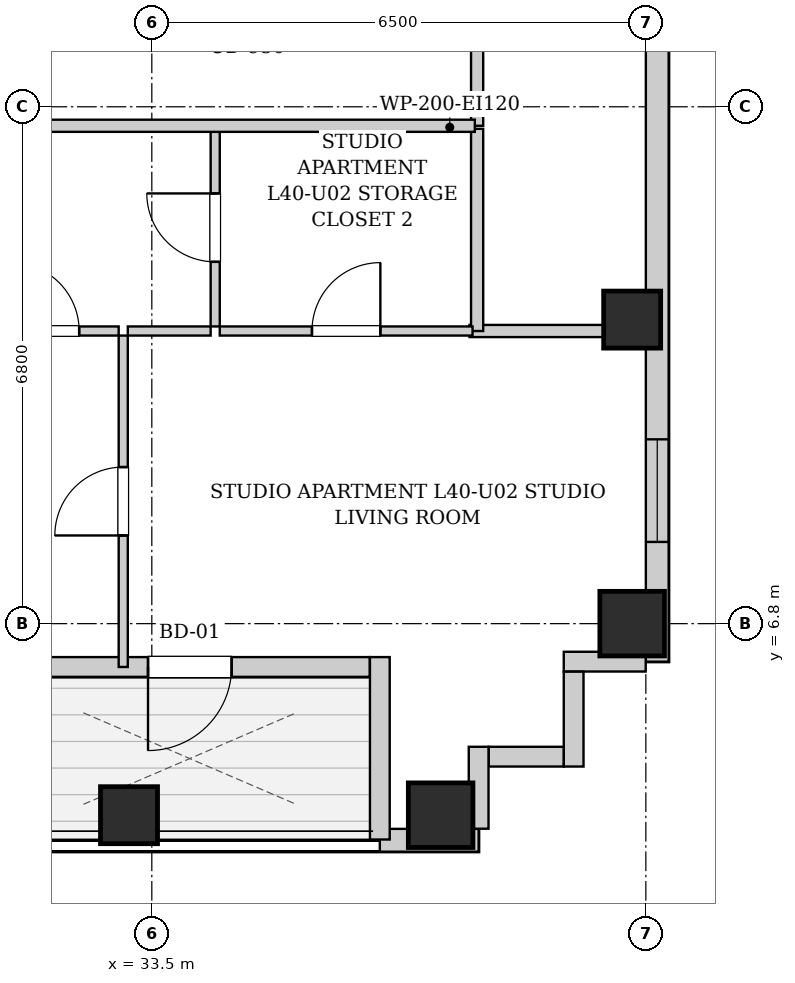
"""IFC4 building model, lengths in metres.
Left out: names, types, materials, properties, quantities, classifications, styles, units other than length and angle.
Written with IfcOpenShell. Run it as: python <this file> out.ifc"""

import sys

from ifc_helpers import new_model, si_unit, direction, frame, frame_2d, origin, origin_2d, place, context, subcontext, project, spatial, rectangle, extrude, element, fill, save


model = new_model("IFC4")
c1 = context("Model", 3, precision=1e-05, world=origin(), true_north=direction((0.0, 1.0)))
c2 = subcontext(c1, "Body", "Model", "MODEL_VIEW")
j1 = project(units=[si_unit("LENGTHUNIT", "METRE"), si_unit("PLANEANGLEUNIT", "RADIAN")], contexts=[c1])
p1 = place(None, origin())
s1 = spatial("IfcSite", under=j1, at=p1, CompositionType="ELEMENT")
p2 = place(p1, origin())
s2 = spatial("IfcBuilding", under=s1, at=p2, CompositionType="ELEMENT")
p3 = place(p2, frame((0.0, 0.0, 140.65)))
s3 = spatial("IfcBuildingStorey", under=s2, at=p3, CompositionType="ELEMENT", Elevation=140.65)
p4 = place(p3, frame((33.2, 4.28, 0.0), z_axis=(0.0, 0.0, 1.0), x_axis=(1.0, 0.0, 0.0)))
e1 = element("IfcColumn", 1, at=p4, inside=s3, PredefinedType="COLUMN", context=c2, shape_type="SweptSolid", body=[
    extrude(rectangle(XDim=0.75, YDim=0.75, at=origin_2d()), origin(), (0.0, 0.0, 1.0), 3.25),
])
for number, where, z_axis, x_axis in (
    (2, (37.3, 4.28, 0.0), (0.0, 0.0, 1.0), (1.0, 0.0, 0.0)),
    (3, (39.82, 6.8, 0.0), (0.0, 0.0, 1.0), (1.0, 0.0, 0.0)),
):
    element("IfcColumn", number, at=place(p3, frame(where, z_axis=z_axis, x_axis=x_axis)), inside=s3, PredefinedType="COLUMN", context=c2, shape_type="SweptSolid", body=[
        extrude(rectangle(XDim=0.85, YDim=0.85, at=origin_2d()), origin(), (0.0, 0.0, 1.0), 3.25),
    ])
p5 = place(p3, frame((39.82, 10.8, 0.0), z_axis=(0.0, 0.0, 1.0), x_axis=(1.0, 0.0, 0.0)))
e4 = element("IfcColumn", 4, at=p5, inside=s3, PredefinedType="COLUMN", context=c2, shape_type="SweptSolid", body=[
    extrude(rectangle(XDim=0.75, YDim=0.75, at=origin_2d()), origin(), (0.0, 0.0, 1.0), 3.25),
])
p6 = place(p3, frame((40.15, 40.8, 0.0), z_axis=(0.0, 0.0, 1.0), x_axis=(0.0, -1.0, 0.0)))
e5 = element("IfcWall", 5, at=p6, inside=s3, PredefinedType="SOLIDWALL", context=c2, shape_type="SweptSolid", body=[
    extrude(rectangle(XDim=34.5, YDim=0.3, at=frame_2d((17.25, 0.0))), origin(), (0.0, 0.0, 1.0), 2.99),
])
p7 = place(p6, frame((31.575, 0.0, 0.55)))
e6 = element("IfcOpeningElement", 6, at=p7, cuts=e5, PredefinedType="OPENING", context=c2, shape_type="SweptSolid", body=[
    extrude(rectangle(XDim=1.35, YDim=1.2, at=frame_2d((0.675, 0.6))), frame((0.0, 0.16, 0.0), z_axis=(0.0, -1.0, 0.0), x_axis=(1.0, 0.0, 0.0)), (0.0, 0.0, 1.0), 0.32),
])
p8 = place(p6, frame((3.075, 0.0, 0.55)))
e7 = element("IfcOpeningElement", 7, at=p8, cuts=e5, PredefinedType="OPENING", context=c2, shape_type="SweptSolid", body=[
    extrude(rectangle(XDim=1.35, YDim=1.2, at=frame_2d((0.675, 0.6))), frame((0.0, 0.16, 0.0), z_axis=(0.0, -1.0, 0.0), x_axis=(1.0, 0.0, 0.0)), (0.0, 0.0, 1.0), 0.32),
])
p9 = place(p6, frame((1.085, 0.0, 0.55)))
e8 = element("IfcOpeningElement", 8, at=p9, cuts=e5, PredefinedType="OPENING", context=c2, shape_type="SweptSolid", body=[
    extrude(rectangle(XDim=1.35, YDim=1.2, at=frame_2d((0.675, 0.6))), frame((0.0, 0.16, 0.0), z_axis=(0.0, -1.0, 0.0), x_axis=(1.0, 0.0, 0.0)), (0.0, 0.0, 1.0), 0.32),
])
p10 = place(p6, frame((22.8, 0.0, 0.55)))
e9 = element("IfcOpeningElement", 9, at=p10, cuts=e5, PredefinedType="OPENING", context=c2, shape_type="SweptSolid", body=[
    extrude(rectangle(XDim=1.35, YDim=1.2, at=frame_2d((0.675, 0.6))), frame((0.0, 0.16, 0.0), z_axis=(0.0, -1.0, 0.0), x_axis=(1.0, 0.0, 0.0)), (0.0, 0.0, 1.0), 0.32),
])
p11 = place(p6, frame((13.425, 0.0, 0.55)))
e10 = element("IfcOpeningElement", 10, at=p11, cuts=e5, PredefinedType="OPENING", context=c2, shape_type="SweptSolid", body=[
    extrude(rectangle(XDim=1.35, YDim=1.2, at=frame_2d((0.675, 0.6))), frame((0.0, 0.16, 0.0), z_axis=(0.0, -1.0, 0.0), x_axis=(1.0, 0.0, 0.0)), (0.0, 0.0, 1.0), 0.32),
])
p12 = place(p3, frame((37.8, 3.95, 0.0), z_axis=(0.0, 0.0, 1.0), x_axis=(-1.0, 0.0, 0.0)))
e11 = element("IfcWall", 11, at=p12, inside=s3, PredefinedType="SOLIDWALL", context=c2, shape_type="SweptSolid", body=[
    extrude(rectangle(XDim=1.3, YDim=0.3, at=frame_2d((0.65, 0.0))), origin(), (0.0, 0.0, 1.0), 2.99),
])
p13 = place(p3, frame((36.5, 3.96, 0.0), z_axis=(0.0, 0.0, 1.0), x_axis=(0.0, 1.0, 0.0)))
e12 = element("IfcWall", 12, at=p13, inside=s3, PredefinedType="SOLIDWALL", context=c2, shape_type="SweptSolid", body=[
    extrude(rectangle(XDim=2.4, YDim=0.26, at=frame_2d((1.2, 0.0))), origin(), (0.0, 0.0, 1.0), 2.99),
])
p14 = place(p3, frame((36.366, 6.23, 0.0), z_axis=(0.0, 0.0, 1.0), x_axis=(-1.0, 0.0, 0.0)))
e13 = element("IfcWall", 13, at=p14, inside=s3, PredefinedType="SOLIDWALL", context=c2, shape_type="SweptSolid", body=[
    extrude(rectangle(XDim=4.732, YDim=0.26, at=frame_2d((2.366, 0.0))), origin(), (0.0, 0.0, 1.0), 2.99),
])
p15 = place(p14, frame((1.816, 0.0, 0.0)))
e14 = element("IfcOpeningElement", 14, at=p15, cuts=e13, PredefinedType="OPENING", context=c2, shape_type="SweptSolid", body=[
    extrude(rectangle(XDim=1.1, YDim=2.0, at=frame_2d((0.55, 1.0))), frame((0.0, 0.14, 0.0), z_axis=(0.0, -1.0, 0.0), x_axis=(1.0, 0.0, 0.0)), (0.0, 0.0, 1.0), 0.28),
])
p16 = place(p3, frame((39.998, 6.3, 0.0), z_axis=(0.0, 0.0, 1.0), x_axis=(-1.0, 0.0, 0.0)))
e15 = element("IfcWall", 15, at=p16, inside=s3, PredefinedType="SOLIDWALL", context=c2, shape_type="SweptSolid", body=[
    extrude(rectangle(XDim=1.078, YDim=0.26, at=frame_2d((0.539, 0.0))), origin(), (0.0, 0.0, 1.0), 2.99),
])
p17 = place(p3, frame((39.05, 6.168, 0.0), z_axis=(0.0, 0.0, 1.0), x_axis=(0.0, -1.0, 0.0)))
e16 = element("IfcWall", 16, at=p17, inside=s3, PredefinedType="SOLIDWALL", context=c2, shape_type="SweptSolid", body=[
    extrude(rectangle(XDim=1.248, YDim=0.26, at=frame_2d((0.624, 0.0))), origin(), (0.0, 0.0, 1.0), 2.99),
])
p18 = place(p3, frame((38.918, 5.05, 0.0), z_axis=(0.0, 0.0, 1.0), x_axis=(-1.0, 0.0, 0.0)))
e17 = element("IfcWall", 17, at=p18, inside=s3, PredefinedType="SOLIDWALL", context=c2, shape_type="SweptSolid", body=[
    extrude(rectangle(XDim=0.986, YDim=0.26, at=frame_2d((0.493, 0.0))), origin(), (0.0, 0.0, 1.0), 2.99),
])
p19 = place(p3, frame((37.8, 5.18, 0.0), z_axis=(0.0, 0.0, 1.0), x_axis=(0.0, -1.0, 0.0)))
e18 = element("IfcWall", 18, at=p19, inside=s3, PredefinedType="SOLIDWALL", context=c2, shape_type="SweptSolid", body=[
    extrude(rectangle(XDim=1.078, YDim=0.26, at=frame_2d((0.539, 0.0))), origin(), (0.0, 0.0, 1.0), 2.99),
])
p20 = place(p3, frame((37.78, 13.35, 0.0), z_axis=(0.0, 0.0, 1.0), x_axis=(0.0, 1.0, 0.0)))
e19 = element("IfcWall", 19, at=p20, inside=s3, PredefinedType="PARTITIONING", context=c2, shape_type="SweptSolid", body=[
    extrude(rectangle(XDim=1.74, YDim=0.16, at=frame_2d((0.87, 0.0))), origin(), (0.0, 0.0, 1.0), 2.99),
])
p21 = place(p3, frame((37.68, 10.65, 0.0), z_axis=(0.0, 0.0, 1.0), x_axis=(1.0, 0.0, 0.0)))
e20 = element("IfcWall", 20, at=p21, inside=s3, PredefinedType="PARTITIONING", context=c2, shape_type="SweptSolid", body=[
    extrude(rectangle(XDim=2.34, YDim=0.16, at=frame_2d((1.17, 0.0))), origin(), (0.0, 0.0, 1.0), 2.99),
])
p22 = place(p3, frame((37.78, 10.65, 0.0), z_axis=(0.0, 0.0, 1.0), x_axis=(0.0, 1.0, 0.0)))
e21 = element("IfcWall", 21, at=p22, inside=s3, PredefinedType="PARTITIONING", context=c2, shape_type="SweptSolid", body=[
    extrude(rectangle(XDim=2.66, YDim=0.16, at=frame_2d((1.33, 0.0))), origin(), (0.0, 0.0, 1.0), 2.99),
])
p23 = place(p3, frame((34.334, 10.71, 0.0), z_axis=(0.0, 0.0, 1.0), x_axis=(0.0, 1.0, 0.0)))
e22 = element("IfcWall", 22, at=p23, inside=s3, PredefinedType="PARTITIONING", context=c2, shape_type="SweptSolid", body=[
    extrude(rectangle(XDim=2.6, YDim=0.12, at=frame_2d((1.3, 0.0))), origin(), (0.0, 0.0, 1.0), 2.99),
])
p24 = place(p23, frame((0.85, 0.0, 0.0)))
e23 = element("IfcOpeningElement", 23, at=p24, cuts=e22, PredefinedType="OPENING", context=c2, shape_type="SweptSolid", body=[
    extrude(rectangle(XDim=0.9, YDim=2.05, at=frame_2d((0.45, 1.025))), frame((0.0, 0.07, 0.0), z_axis=(0.0, -1.0, 0.0), x_axis=(1.0, 0.0, 0.0)), (0.0, 0.0, 1.0), 0.14),
])
p25 = place(p3, frame((31.124, 10.65, 0.0), z_axis=(0.0, 0.0, 1.0), x_axis=(1.0, 0.0, 0.0)))
e24 = element("IfcWall", 24, at=p25, inside=s3, PredefinedType="PARTITIONING", context=c2, shape_type="SweptSolid", body=[
    extrude(rectangle(XDim=1.94, YDim=0.12, at=frame_2d((0.97, 0.0))), origin(), (0.0, 0.0, 1.0), 2.99),
])
p26 = place(p25, frame((0.52, 0.0, 0.0)))
e25 = element("IfcOpeningElement", 25, at=p26, cuts=e24, PredefinedType="OPENING", context=c2, shape_type="SweptSolid", body=[
    extrude(rectangle(XDim=0.9, YDim=2.05, at=frame_2d((0.45, 1.025))), frame((0.0, 0.07, 0.0), z_axis=(0.0, -1.0, 0.0), x_axis=(1.0, 0.0, 0.0)), (0.0, 0.0, 1.0), 0.14),
])
p27 = place(p3, frame((33.184, 10.65, 0.0), z_axis=(0.0, 0.0, 1.0), x_axis=(1.0, 0.0, 0.0)))
e26 = element("IfcWall", 26, at=p27, inside=s3, PredefinedType="PARTITIONING", context=c2, shape_type="SweptSolid", body=[
    extrude(rectangle(XDim=1.09, YDim=0.12, at=frame_2d((0.545, 0.0))), origin(), (0.0, 0.0, 1.0), 2.99),
])
p28 = place(p3, frame((34.394, 10.65, 0.0), z_axis=(0.0, 0.0, 1.0), x_axis=(1.0, 0.0, 0.0)))
e27 = element("IfcWall", 27, at=p28, inside=s3, PredefinedType="PARTITIONING", context=c2, shape_type="SweptSolid", body=[
    extrude(rectangle(XDim=3.326, YDim=0.12, at=frame_2d((1.663, 0.0))), origin(), (0.0, 0.0, 1.0), 2.99),
])
p29 = place(p28, frame((1.213, 0.0, 0.0)))
e28 = element("IfcOpeningElement", 28, at=p29, cuts=e27, PredefinedType="OPENING", context=c2, shape_type="SweptSolid", body=[
    extrude(rectangle(XDim=0.9, YDim=2.05, at=frame_2d((0.45, 1.025))), frame((0.0, 0.07, 0.0), z_axis=(0.0, -1.0, 0.0), x_axis=(1.0, 0.0, 0.0)), (0.0, 0.0, 1.0), 0.14),
])
p30 = place(p3, frame((33.124, 6.23, 0.0), z_axis=(0.0, 0.0, 1.0), x_axis=(0.0, 1.0, 0.0)))
e29 = element("IfcWall", 29, at=p30, inside=s3, PredefinedType="PARTITIONING", context=c2, shape_type="SweptSolid", body=[
    extrude(rectangle(XDim=4.36, YDim=0.12, at=frame_2d((2.18, 0.0))), origin(), (0.0, 0.0, 1.0), 2.426),
])
p31 = place(p30, frame((1.73, 0.0, 0.0)))
e30 = element("IfcOpeningElement", 30, at=p31, cuts=e29, PredefinedType="OPENING", context=c2, shape_type="SweptSolid", body=[
    extrude(rectangle(XDim=0.9, YDim=2.05, at=frame_2d((0.45, 1.025))), frame((0.0, 0.07, 0.0), z_axis=(0.0, -1.0, 0.0), x_axis=(1.0, 0.0, 0.0)), (0.0, 0.0, 1.0), 0.14),
])
p32 = place(p3, frame((10.05, 13.35, 0.0), z_axis=(0.0, 0.0, 1.0), x_axis=(1.0, 0.0, 0.0)))
e31 = element("IfcWall", 31, at=p32, inside=s3, PredefinedType="PARTITIONING", context=c2, shape_type="SweptSolid", body=[
    extrude(rectangle(XDim=27.7, YDim=0.16, at=frame_2d((13.85, 0.0))), origin(), (0.0, 0.0, 1.0), 2.99),
])
p33 = place(p32, frame((4.063, 0.0, 0.0)))
e32 = element("IfcOpeningElement", 32, at=p33, cuts=e31, PredefinedType="OPENING", context=c2, shape_type="SweptSolid", body=[
    extrude(rectangle(XDim=0.95, YDim=2.1, at=frame_2d((0.475, 1.05))), frame((0.0, 0.09, 0.0), z_axis=(0.0, -1.0, 0.0), x_axis=(1.0, 0.0, 0.0)), (0.0, 0.0, 1.0), 0.18),
])
p34 = place(p32, frame((11.735, 0.0, 0.0)))
e33 = element("IfcOpeningElement", 33, at=p34, cuts=e31, PredefinedType="OPENING", context=c2, shape_type="SweptSolid", body=[
    extrude(rectangle(XDim=0.95, YDim=2.1, at=frame_2d((0.475, 1.05))), frame((0.0, 0.09, 0.0), z_axis=(0.0, -1.0, 0.0), x_axis=(1.0, 0.0, 0.0)), (0.0, 0.0, 1.0), 0.18),
])
p35 = place(p24, origin())
e34 = element("IfcDoor", 34, at=p35, inside=s3, OperationType="SINGLE_SWING_RIGHT", PredefinedType="DOOR", context=c2, shape_type="SweptSolid", body=[
    extrude(rectangle(XDim=0.9, YDim=2.05, at=frame_2d((0.45, 1.025))), frame((0.0, 0.025, 0.0), z_axis=(0.0, -1.0, 0.0), x_axis=(1.0, 0.0, 0.0)), (0.0, 0.0, 1.0), 0.05),
])
fill(e23, e34)
p36 = place(p26, origin())
e35 = element("IfcDoor", 35, at=p36, inside=s3, OperationType="SINGLE_SWING_LEFT", PredefinedType="DOOR", context=c2, shape_type="SweptSolid", body=[
    extrude(rectangle(XDim=0.9, YDim=2.05, at=frame_2d((0.45, 1.025))), frame((0.0, 0.025, 0.0), z_axis=(0.0, -1.0, 0.0), x_axis=(1.0, 0.0, 0.0)), (0.0, 0.0, 1.0), 0.05),
])
fill(e25, e35)
p37 = place(p29, origin())
e36 = element("IfcDoor", 36, at=p37, inside=s3, OperationType="SINGLE_SWING_RIGHT", PredefinedType="DOOR", context=c2, shape_type="SweptSolid", body=[
    extrude(rectangle(XDim=0.9, YDim=2.05, at=frame_2d((0.45, 1.025))), frame((0.0, 0.025, 0.0), z_axis=(0.0, -1.0, 0.0), x_axis=(1.0, 0.0, 0.0)), (0.0, 0.0, 1.0), 0.05),
])
fill(e28, e36)
p38 = place(p31, origin())
e37 = element("IfcDoor", 37, at=p38, inside=s3, OperationType="SINGLE_SWING_LEFT", PredefinedType="DOOR", context=c2, shape_type="SweptSolid", body=[
    extrude(rectangle(XDim=0.9, YDim=2.05, at=frame_2d((0.45, 1.025))), frame((0.0, 0.025, 0.0), z_axis=(0.0, -1.0, 0.0), x_axis=(1.0, 0.0, 0.0)), (0.0, 0.0, 1.0), 0.05),
])
fill(e30, e37)
p39 = place(p15, origin())
e38 = element("IfcDoor", 38, at=p39, inside=s3, OperationType="SINGLE_SWING_RIGHT", PredefinedType="DOOR", context=c2, shape_type="SweptSolid", body=[
    extrude(rectangle(XDim=1.1, YDim=2.0, at=frame_2d((0.55, 1.0))), frame((0.0, 0.025, 0.0), z_axis=(0.0, -1.0, 0.0), x_axis=(1.0, 0.0, 0.0)), (0.0, 0.0, 1.0), 0.05),
])
fill(e14, e38)
p40 = place(p7, origin())
e39 = element("IfcWindow", 39, at=p40, inside=s3, PartitioningType="SINGLE_PANEL", PredefinedType="WINDOW", context=c2, shape_type="SweptSolid", body=[
    extrude(rectangle(XDim=1.35, YDim=1.2, at=frame_2d((0.675, 0.6))), frame((0.0, 0.03, 0.0), z_axis=(0.0, -1.0, 0.0), x_axis=(1.0, 0.0, 0.0)), (0.0, 0.0, 1.0), 0.06),
])
fill(e6, e39)
save(model, sys.argv[1])
